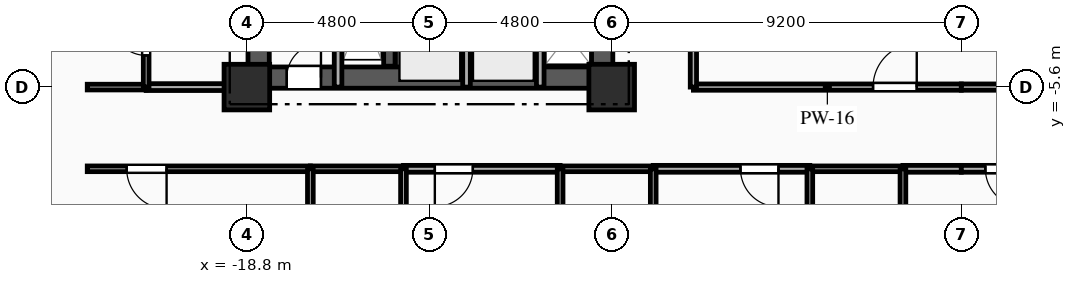
"""IFC4 building model, lengths in metres.
Left out: names, types, materials, properties, quantities, classifications, styles, units other than length and angle.
Written with IfcOpenShell. Run it as: python <this file> out.ifc"""

import sys

from ifc_helpers import new_model, si_unit, direction, frame, frame_2d, origin, origin_2d, place, context, subcontext, project, spatial, rectangle, extrude, element, fill, save


model = new_model("IFC4")
c1 = context("Model", 3, precision=1e-05, world=origin(), true_north=direction((0.0, 1.0)))
c2 = subcontext(c1, "Body", "Model", "MODEL_VIEW")
j1 = project(units=[si_unit("LENGTHUNIT", "METRE"), si_unit("PLANEANGLEUNIT", "RADIAN")], contexts=[c1])
p1 = place(None, origin())
s1 = spatial("IfcSite", under=j1, at=p1, CompositionType="ELEMENT")
p2 = place(p1, origin())
s2 = spatial("IfcBuilding", under=s1, at=p2, CompositionType="ELEMENT")
p3 = place(p2, frame((0.0, 0.0, 57.15)))
s3 = spatial("IfcBuildingStorey", under=s2, at=p3, CompositionType="ELEMENT", Elevation=57.15)
for number, where, z_axis, x_axis in (
    (1, (-18.8, -5.6, 0.0), (0.0, 0.0, 1.0), (1.0, 0.0, 0.0)),
    (2, (-9.2, -5.6, 0.0), (0.0, 0.0, 1.0), (1.0, 0.0, 0.0)),
):
    element("IfcColumn", number, at=place(p3, frame(where, z_axis=z_axis, x_axis=x_axis)), inside=s3, PredefinedType="COLUMN", context=c2, shape_type="SweptSolid", body=[
        extrude(rectangle(XDim=1.2, YDim=1.2, at=origin_2d()), origin(), (0.0, 0.0, 1.0), 3.35),
    ])
p4 = place(p3, frame((-18.8, -5.35, 0.0), z_axis=(0.0, 0.0, 1.0), x_axis=(1.0, 0.0, 0.0)))
e3 = element("IfcWall", 3, at=p4, inside=s3, PredefinedType="SHEAR", context=c2, shape_type="SweptSolid", body=[
    extrude(rectangle(XDim=9.6, YDim=0.56, at=frame_2d((4.8, 0.0))), origin(), (0.0, 0.0, 1.0), 3.035),
])
p5 = place(p4, frame((1.05, 0.0, 0.0)))
e4 = element("IfcOpeningElement", 4, at=p5, cuts=e3, PredefinedType="OPENING", context=c2, shape_type="SweptSolid", body=[
    extrude(rectangle(XDim=0.9, YDim=2.1, at=frame_2d((0.45, 1.05))), frame((0.0, 0.29, 0.0), z_axis=(0.0, -1.0, 0.0), x_axis=(1.0, 0.0, 0.0)), (0.0, 0.0, 1.0), 0.58),
])
p6 = place(p3, frame((-18.49, -5.05, 0.0), z_axis=(0.0, 0.0, 1.0), x_axis=(0.0, 1.0, 0.0)))
e5 = element("IfcWall", 5, at=p6, inside=s3, PredefinedType="SHEAR", context=c2, shape_type="SweptSolid", body=[
    extrude(rectangle(XDim=10.1, YDim=0.56, at=frame_2d((5.05, 0.0))), origin(), (0.0, 0.0, 1.0), 3.035),
])
p7 = place(p3, frame((-9.45, -5.05, 0.0), z_axis=(0.0, 0.0, 1.0), x_axis=(0.0, 1.0, 0.0)))
e6 = element("IfcWall", 6, at=p7, inside=s3, PredefinedType="SHEAR", context=c2, shape_type="SweptSolid", body=[
    extrude(rectangle(XDim=10.1, YDim=0.56, at=frame_2d((5.05, 0.0))), origin(), (0.0, 0.0, 1.0), 3.035),
])
p8 = place(p7, frame((7.15, 0.0, 0.0)))
e7 = element("IfcOpeningElement", 7, at=p8, cuts=e6, PredefinedType="OPENING", context=c2, shape_type="SweptSolid", body=[
    extrude(rectangle(XDim=0.9, YDim=2.1, at=frame_2d((0.45, 1.05))), frame((0.0, 0.29, 0.0), z_axis=(0.0, -1.0, 0.0), x_axis=(1.0, 0.0, 0.0)), (0.0, 0.0, 1.0), 0.58),
])
p9 = place(p7, frame((2.4, 0.0, 0.0)))
e8 = element("IfcOpeningElement", 8, at=p9, cuts=e6, PredefinedType="OPENING", context=c2, shape_type="SweptSolid", body=[
    extrude(rectangle(XDim=1.2, YDim=2.15, at=frame_2d((0.6, 1.075))), frame((0.0, 0.29, 0.0), z_axis=(0.0, -1.0, 0.0), x_axis=(1.0, 0.0, 0.0)), (0.0, 0.0, 1.0), 0.58),
])
p10 = place(p3, frame((-15.05, -5.05, 0.0), z_axis=(0.0, 0.0, 1.0), x_axis=(0.0, 1.0, 0.0)))
e9 = element("IfcWall", 9, at=p10, inside=s3, PredefinedType="SHEAR", context=c2, shape_type="SweptSolid", body=[
    extrude(rectangle(XDim=10.1, YDim=0.3, at=frame_2d((5.05, 0.0))), origin(), (0.0, 0.0, 1.0), 3.035),
])
p11 = place(p3, frame((-16.4, -5.6, 0.0), z_axis=(0.0, 0.0, 1.0), x_axis=(0.0, 1.0, 0.0)))
e10 = element("IfcWall", 10, at=p11, inside=s3, PredefinedType="PARTITIONING", context=c2, shape_type="SweptSolid", body=[
    extrude(rectangle(XDim=3.49, YDim=0.2, at=frame_2d((1.745, 0.0))), origin(), (0.0, 0.0, 1.0), 3.035),
])
for number, where, z_axis, x_axis in (
    (11, (-13.02, -5.6, 0.0), (0.0, 0.0, 1.0), (0.0, 1.0, 0.0)),
    (12, (-11.08, -5.6, 0.0), (0.0, 0.0, 1.0), (0.0, 1.0, 0.0)),
):
    element("IfcWall", number, at=place(p3, frame(where, z_axis=z_axis, x_axis=x_axis)), inside=s3, PredefinedType="PARTITIONING", context=c2, shape_type="SweptSolid", body=[
        extrude(rectangle(XDim=2.25, YDim=0.2, at=frame_2d((1.125, 0.0))), origin(), (0.0, 0.0, 1.0), 3.035),
    ])
p12 = place(p3, frame((-21.45, -5.6, 0.0), z_axis=(0.0, 0.0, 1.0), x_axis=(1.0, 0.0, 0.0)))
e13 = element("IfcWall", 13, at=p12, inside=s3, PredefinedType="PARTITIONING", context=c2, shape_type="SweptSolid", body=[
    extrude(rectangle(XDim=2.65, YDim=0.18, at=frame_2d((1.325, 0.0))), origin(), (0.0, 0.0, 1.0), 3.035),
])
p13 = place(p3, frame((-23.0, -5.6, 0.0), z_axis=(0.0, 0.0, 1.0), x_axis=(1.0, 0.0, 0.0)))
e14 = element("IfcWall", 14, at=p13, inside=s3, PredefinedType="PLUMBINGWALL", context=c2, shape_type="SweptSolid", body=[
    extrude(rectangle(XDim=1.55, YDim=0.15, at=frame_2d((0.775, 0.0))), origin(), (0.0, 0.0, 1.0), 3.035),
])
p14 = place(p3, frame((-17.129, -7.75, 0.0), z_axis=(0.0, 0.0, 1.0), x_axis=(-1.0, 0.0, 0.0)))
e15 = element("IfcWall", 15, at=p14, inside=s3, PredefinedType="PARTITIONING", context=c2, shape_type="SweptSolid", body=[
    extrude(rectangle(XDim=5.871, YDim=0.15, at=frame_2d((2.936, 0.0))), origin(), (0.0, 0.0, 1.0), 3.035),
])
p15 = place(p14, frame((3.783, 0.0, 0.0)))
e16 = element("IfcOpeningElement", 16, at=p15, cuts=e15, PredefinedType="OPENING", context=c2, shape_type="SweptSolid", body=[
    extrude(rectangle(XDim=1.05, YDim=2.15, at=frame_2d((0.525, 1.075))), frame((0.0, 0.085, 0.0), z_axis=(0.0, -1.0, 0.0), x_axis=(1.0, 0.0, 0.0)), (0.0, 0.0, 1.0), 0.17),
])
p16 = place(p3, frame((-10.557, -7.75, 0.0), z_axis=(0.0, 0.0, 1.0), x_axis=(-1.0, 0.0, 0.0)))
e17 = element("IfcWall", 17, at=p16, inside=s3, PredefinedType="PARTITIONING", context=c2, shape_type="SweptSolid", body=[
    extrude(rectangle(XDim=4.122, YDim=0.18, at=frame_2d((2.061, 0.0))), origin(), (0.0, 0.0, 1.0), 3.035),
])
p17 = place(p16, frame((2.297, 0.0, 0.0)))
e18 = element("IfcOpeningElement", 18, at=p17, cuts=e17, PredefinedType="OPENING", context=c2, shape_type="SweptSolid", body=[
    extrude(rectangle(XDim=1.0, YDim=2.15, at=frame_2d((0.5, 1.075))), frame((0.0, 0.1, 0.0), z_axis=(0.0, -1.0, 0.0), x_axis=(1.0, 0.0, 0.0)), (0.0, 0.0, 1.0), 0.2),
])
p18 = place(p3, frame((-14.679, -7.75, 0.0), z_axis=(0.0, 0.0, 1.0), x_axis=(-1.0, 0.0, 0.0)))
e19 = element("IfcWall", 19, at=p18, inside=s3, PredefinedType="PLUMBINGWALL", context=c2, shape_type="SweptSolid", body=[
    extrude(rectangle(XDim=2.45, YDim=0.15, at=frame_2d((1.225, 0.0))), origin(), (0.0, 0.0, 1.0), 3.035),
])
p19 = place(p3, frame((-3.986, -7.75, 0.0), z_axis=(0.0, 0.0, 1.0), x_axis=(-1.0, 0.0, 0.0)))
e20 = element("IfcWall", 20, at=p19, inside=s3, PredefinedType="PARTITIONING", context=c2, shape_type="SweptSolid", body=[
    extrude(rectangle(XDim=4.121, YDim=0.18, at=frame_2d((2.061, 0.0))), origin(), (0.0, 0.0, 1.0), 3.035),
])
p20 = place(p19, frame((0.825, 0.0, 0.0)))
e21 = element("IfcOpeningElement", 21, at=p20, cuts=e20, PredefinedType="OPENING", context=c2, shape_type="SweptSolid", body=[
    extrude(rectangle(XDim=1.0, YDim=2.15, at=frame_2d((0.5, 1.075))), frame((0.0, 0.1, 0.0), z_axis=(0.0, -1.0, 0.0), x_axis=(1.0, 0.0, 0.0)), (0.0, 0.0, 1.0), 0.2),
])
p21 = place(p3, frame((-8.107, -7.75, 0.0), z_axis=(0.0, 0.0, 1.0), x_axis=(-1.0, 0.0, 0.0)))
e22 = element("IfcWall", 22, at=p21, inside=s3, PredefinedType="PLUMBINGWALL", context=c2, shape_type="SweptSolid", body=[
    extrude(rectangle(XDim=2.45, YDim=0.15, at=frame_2d((1.225, 0.0))), origin(), (0.0, 0.0, 1.0), 3.035),
])
p22 = place(p3, frame((0.0, -7.75, 0.0), z_axis=(0.0, 0.0, 1.0), x_axis=(-1.0, 0.0, 0.0)))
e23 = element("IfcWall", 23, at=p22, inside=s3, PredefinedType="PARTITIONING", context=c2, shape_type="SweptSolid", body=[
    extrude(rectangle(XDim=1.536, YDim=0.18, at=frame_2d((0.768, 0.0))), origin(), (0.0, 0.0, 1.0), 3.035),
])
p23 = place(p3, frame((-1.536, -7.75, 0.0), z_axis=(0.0, 0.0, 1.0), x_axis=(-1.0, 0.0, 0.0)))
e24 = element("IfcWall", 24, at=p23, inside=s3, PredefinedType="PLUMBINGWALL", context=c2, shape_type="SweptSolid", body=[
    extrude(rectangle(XDim=2.45, YDim=0.15, at=frame_2d((1.225, 0.0))), origin(), (0.0, 0.0, 1.0), 3.035),
])
p24 = place(p3, frame((-7.05, -5.6, 0.0), z_axis=(0.0, 0.0, 1.0), x_axis=(1.0, 0.0, 0.0)))
e25 = element("IfcWall", 25, at=p24, inside=s3, PredefinedType="PARTITIONING", context=c2, shape_type="SweptSolid", body=[
    extrude(rectangle(XDim=7.05, YDim=0.165, at=frame_2d((3.525, 0.0))), origin(), (0.0, 0.0, 1.0), 2.52),
])
p25 = place(p24, frame((4.728, 0.0, 0.0)))
e26 = element("IfcOpeningElement", 26, at=p25, cuts=e25, PredefinedType="OPENING", context=c2, shape_type="SweptSolid", body=[
    extrude(rectangle(XDim=1.15, YDim=2.15, at=frame_2d((0.575, 1.075))), frame((0.0, 0.093, 0.0), z_axis=(0.0, -1.0, 0.0), x_axis=(1.0, 0.0, 0.0)), (0.0, 0.0, 1.0), 0.185),
])
p26 = place(p3, frame((2.586, -7.75, 0.0), z_axis=(0.0, 0.0, 1.0), x_axis=(-1.0, 0.0, 0.0)))
e27 = element("IfcWall", 27, at=p26, inside=s3, PredefinedType="PARTITIONING", context=c2, shape_type="SweptSolid", body=[
    extrude(rectangle(XDim=2.586, YDim=0.18, at=frame_2d((1.293, 0.0))), origin(), (0.0, 0.0, 1.0), 3.035),
])
p27 = place(p26, frame((0.953, 0.0, 0.0)))
e28 = element("IfcOpeningElement", 28, at=p27, cuts=e27, PredefinedType="OPENING", context=c2, shape_type="SweptSolid", body=[
    extrude(rectangle(XDim=1.0, YDim=2.15, at=frame_2d((0.5, 1.075))), frame((0.0, 0.1, 0.0), z_axis=(0.0, -1.0, 0.0), x_axis=(1.0, 0.0, 0.0)), (0.0, 0.0, 1.0), 0.2),
])
p28 = place(p3, frame((0.0, -5.6, 0.0), z_axis=(0.0, 0.0, 1.0), x_axis=(1.0, 0.0, 0.0)))
e29 = element("IfcWall", 29, at=p28, inside=s3, PredefinedType="PARTITIONING", context=c2, shape_type="SweptSolid", body=[
    extrude(rectangle(XDim=7.05, YDim=0.165, at=frame_2d((3.525, 0.0))), origin(), (0.0, 0.0, 1.0), 2.52),
])
p29 = place(p3, frame((-7.05, 1.45, 0.0), z_axis=(0.0, 0.0, 1.0), x_axis=(0.0, -1.0, 0.0)))
e30 = element("IfcWall", 30, at=p29, inside=s3, PredefinedType="PARTITIONING", context=c2, shape_type="SweptSolid", body=[
    extrude(rectangle(XDim=7.05, YDim=0.165, at=frame_2d((3.525, 0.0))), origin(), (0.0, 0.0, 1.0), 3.035),
])
p30 = place(p3, frame((-21.45, -5.6, 0.0), z_axis=(0.0, 0.0, 1.0), x_axis=(0.0, 1.0, 0.0)))
e31 = element("IfcWall", 31, at=p30, inside=s3, PredefinedType="PLUMBINGWALL", context=c2, shape_type="SweptSolid", body=[
    extrude(rectangle(XDim=2.35, YDim=0.15, at=frame_2d((1.175, 0.0))), origin(), (0.0, 0.0, 1.0), 3.035),
])
p31 = place(p30, frame((0.834, 0.0, 0.0)))
e32 = element("IfcOpeningElement", 32, at=p31, cuts=e31, PredefinedType="OPENING", context=c2, shape_type="SweptSolid", body=[
    extrude(rectangle(XDim=0.9, YDim=2.1, at=frame_2d((0.45, 1.05))), frame((0.0, 0.085, 0.0), z_axis=(0.0, -1.0, 0.0), x_axis=(1.0, 0.0, 0.0)), (0.0, 0.0, 1.0), 0.17),
])
for number, where, z_axis, x_axis in (
    (33, (-17.129, -7.75, 0.0), (0.0, 0.0, 1.0), (0.0, -1.0, 0.0)),
    (34, (-14.679, -9.9, 0.0), (0.0, 0.0, 1.0), (0.0, 1.0, 0.0)),
    (35, (-10.557, -7.75, 0.0), (0.0, 0.0, 1.0), (0.0, -1.0, 0.0)),
    (36, (-8.107, -9.9, 0.0), (0.0, 0.0, 1.0), (0.0, 1.0, 0.0)),
    (37, (-3.986, -7.75, 0.0), (0.0, 0.0, 1.0), (0.0, -1.0, 0.0)),
    (38, (-1.536, -9.9, 0.0), (0.0, 0.0, 1.0), (0.0, 1.0, 0.0)),
):
    element("IfcWall", number, at=place(p3, frame(where, z_axis=z_axis, x_axis=x_axis)), inside=s3, PredefinedType="PLUMBINGWALL", context=c2, shape_type="SweptSolid", body=[
        extrude(rectangle(XDim=2.15, YDim=0.15, at=frame_2d((1.075, 0.0))), origin(), (0.0, 0.0, 1.0), 3.035),
    ])
p32 = place(p5, origin())
e39 = element("IfcDoor", 39, at=p32, inside=s3, OperationType="SINGLE_SWING_RIGHT", PredefinedType="DOOR", context=c2, shape_type="SweptSolid", body=[
    extrude(rectangle(XDim=0.9, YDim=2.1, at=frame_2d((0.45, 1.05))), frame((0.0, 0.025, 0.0), z_axis=(0.0, -1.0, 0.0), x_axis=(1.0, 0.0, 0.0)), (0.0, 0.0, 1.0), 0.05),
])
fill(e4, e39)
p33 = place(p15, origin())
e40 = element("IfcDoor", 40, at=p33, inside=s3, OperationType="SINGLE_SWING_LEFT", PredefinedType="DOOR", context=c2, shape_type="SweptSolid", body=[
    extrude(rectangle(XDim=1.05, YDim=2.15, at=frame_2d((0.525, 1.075))), frame((0.0, 0.025, 0.0), z_axis=(0.0, -1.0, 0.0), x_axis=(1.0, 0.0, 0.0)), (0.0, 0.0, 1.0), 0.05),
])
fill(e16, e40)
p34 = place(p17, origin())
e41 = element("IfcDoor", 41, at=p34, inside=s3, OperationType="SINGLE_SWING_RIGHT", PredefinedType="DOOR", context=c2, shape_type="SweptSolid", body=[
    extrude(rectangle(XDim=1.0, YDim=2.15, at=frame_2d((0.5, 1.075))), frame((0.0, 0.025, 0.0), z_axis=(0.0, -1.0, 0.0), x_axis=(1.0, 0.0, 0.0)), (0.0, 0.0, 1.0), 0.05),
])
fill(e18, e41)
p35 = place(p20, origin())
e42 = element("IfcDoor", 42, at=p35, inside=s3, OperationType="SINGLE_SWING_LEFT", PredefinedType="DOOR", context=c2, shape_type="SweptSolid", body=[
    extrude(rectangle(XDim=1.0, YDim=2.15, at=frame_2d((0.5, 1.075))), frame((0.0, 0.025, 0.0), z_axis=(0.0, -1.0, 0.0), x_axis=(1.0, 0.0, 0.0)), (0.0, 0.0, 1.0), 0.05),
])
fill(e21, e42)
p36 = place(p25, origin())
e43 = element("IfcDoor", 43, at=p36, inside=s3, OperationType="SINGLE_SWING_RIGHT", PredefinedType="DOOR", context=c2, shape_type="SweptSolid", body=[
    extrude(rectangle(XDim=1.15, YDim=2.15, at=frame_2d((0.575, 1.075))), frame((0.0, 0.025, 0.0), z_axis=(0.0, -1.0, 0.0), x_axis=(1.0, 0.0, 0.0)), (0.0, 0.0, 1.0), 0.05),
])
fill(e26, e43)
p37 = place(p27, origin())
e44 = element("IfcDoor", 44, at=p37, inside=s3, OperationType="SINGLE_SWING_LEFT", PredefinedType="DOOR", context=c2, shape_type="SweptSolid", body=[
    extrude(rectangle(XDim=1.0, YDim=2.15, at=frame_2d((0.5, 1.075))), frame((0.0, 0.025, 0.0), z_axis=(0.0, -1.0, 0.0), x_axis=(1.0, 0.0, 0.0)), (0.0, 0.0, 1.0), 0.05),
])
fill(e28, e44)
p38 = place(p31, origin())
e45 = element("IfcDoor", 45, at=p38, inside=s3, OperationType="SINGLE_SWING_RIGHT", PredefinedType="DOOR", context=c2, shape_type="SweptSolid", body=[
    extrude(rectangle(XDim=0.9, YDim=2.1, at=frame_2d((0.45, 1.05))), frame((0.0, 0.025, 0.0), z_axis=(0.0, -1.0, 0.0), x_axis=(1.0, 0.0, 0.0)), (0.0, 0.0, 1.0), 0.05),
])
fill(e32, e45)
save(model, sys.argv[1])
